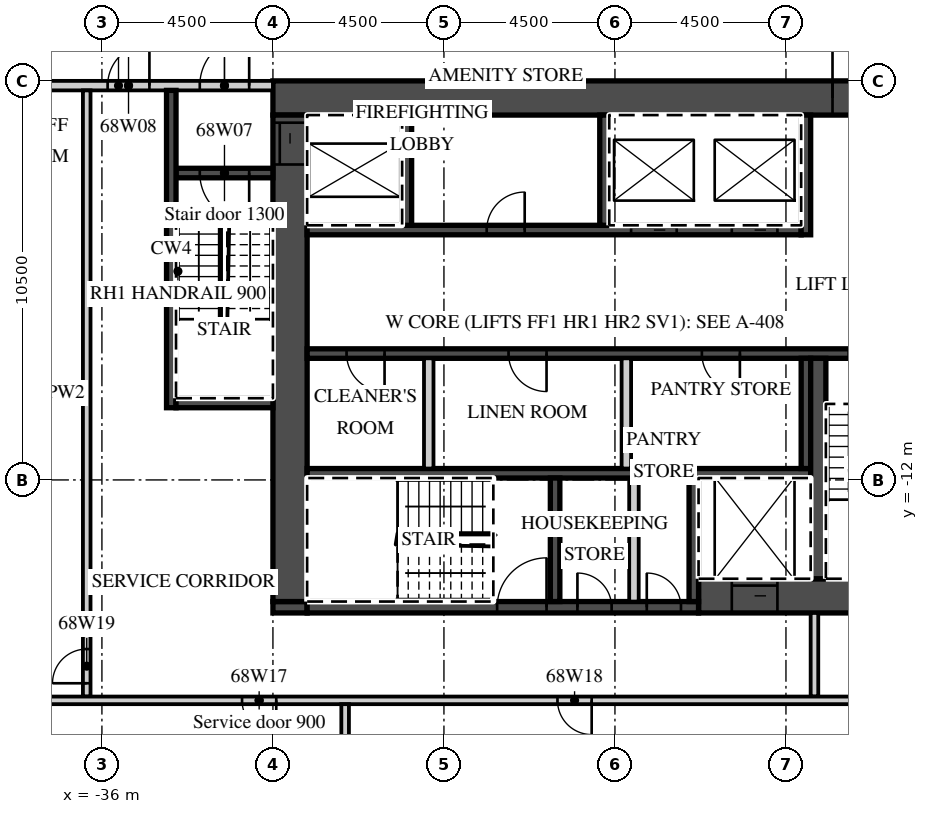
"""IFC4 building model, lengths in metres.
Left out: names, types, materials, properties, quantities, classifications, styles, units other than length and angle.
Written with IfcOpenShell. Run it as: python <this file> out.ifc"""

import sys

from ifc_helpers import new_model, si_unit, direction, frame, frame_2d, origin, place, context, subcontext, project, spatial, rectangle, extrude, element, fill, save


model = new_model("IFC4")
c1 = context("Model", 3, precision=1e-05, world=origin(), true_north=direction((0.0, 1.0)))
c2 = subcontext(c1, "Body", "Model", "MODEL_VIEW")
j1 = project(units=[si_unit("LENGTHUNIT", "METRE"), si_unit("PLANEANGLEUNIT", "RADIAN")], contexts=[c1])
p1 = place(None, origin())
s1 = spatial("IfcSite", under=j1, at=p1, CompositionType="ELEMENT")
p2 = place(p1, origin())
s2 = spatial("IfcBuilding", under=s1, at=p2, CompositionType="ELEMENT")
p3 = place(p2, frame((0.0, 0.0, 275.1)))
s3 = spatial("IfcBuildingStorey", under=s2, at=p3, CompositionType="ELEMENT", Elevation=275.1)
p4 = place(p3, frame((-31.5, -1.95, 0.0), z_axis=(0.0, 0.0, 1.0), x_axis=(1.0, 0.0, 0.0)))
e1 = element("IfcWall", 1, at=p4, inside=s3, PredefinedType="SHEAR", context=c2, shape_type="SweptSolid", body=[
    extrude(rectangle(XDim=18.0, YDim=0.9, at=frame_2d((9.0, 0.0))), origin(), (0.0, 0.0, 1.0), 3.02),
])
p5 = place(p4, frame((14.725, 0.0, 0.0)))
e2 = element("IfcOpeningElement", 2, at=p5, cuts=e1, PredefinedType="OPENING", context=c2, shape_type="SweptSolid", body=[
    extrude(rectangle(XDim=1.8, YDim=2.1, at=frame_2d((0.9, 1.05))), frame((0.0, 0.46, 0.0), z_axis=(0.0, -1.0, 0.0), x_axis=(1.0, 0.0, 0.0)), (0.0, 0.0, 1.0), 0.92),
])
p6 = place(p3, frame((-20.3, -15.05, 0.0), z_axis=(0.0, 0.0, 1.0), x_axis=(1.0, 0.0, 0.0)))
e3 = element("IfcWall", 3, at=p6, inside=s3, PredefinedType="SHEAR", context=c2, shape_type="SweptSolid", body=[
    extrude(rectangle(XDim=6.8, YDim=0.9, at=frame_2d((3.4, 0.0))), origin(), (0.0, 0.0, 1.0), 3.02),
])
p7 = place(p6, frame((0.875, 0.0, 0.0)))
e4 = element("IfcOpeningElement", 4, at=p7, cuts=e3, PredefinedType="OPENING", context=c2, shape_type="SweptSolid", body=[
    extrude(rectangle(XDim=1.2, YDim=2.1, at=frame_2d((0.6, 1.05))), frame((0.0, 0.46, 0.0), z_axis=(0.0, -1.0, 0.0), x_axis=(1.0, 0.0, 0.0)), (0.0, 0.0, 1.0), 0.92),
])
p8 = place(p3, frame((-31.5, -15.35, 0.0), z_axis=(0.0, 0.0, 1.0), x_axis=(1.0, 0.0, 0.0)))
e5 = element("IfcWall", 5, at=p8, inside=s3, PredefinedType="SHEAR", context=c2, shape_type="SweptSolid", body=[
    extrude(rectangle(XDim=0.9, YDim=0.3, at=frame_2d((0.45, 0.0))), origin(), (0.0, 0.0, 1.0), 3.02),
])
p9 = place(p3, frame((-30.6, -15.35, 0.0), z_axis=(0.0, 0.0, 1.0), x_axis=(1.0, 0.0, 0.0)))
e6 = element("IfcWall", 6, at=p9, inside=s3, PredefinedType="SHEAR", context=c2, shape_type="SweptSolid", body=[
    extrude(rectangle(XDim=10.3, YDim=0.3, at=frame_2d((5.15, 0.0))), origin(), (0.0, 0.0, 1.0), 3.02),
])
p10 = place(p9, frame((5.0, 0.0, 0.0)))
e7 = element("IfcOpeningElement", 7, at=p10, cuts=e6, PredefinedType="OPENING", context=c2, shape_type="SweptSolid", body=[
    extrude(rectangle(XDim=1.3, YDim=2.1, at=frame_2d((0.65, 1.05))), frame((0.0, 0.16, 0.0), z_axis=(0.0, -1.0, 0.0), x_axis=(1.0, 0.0, 0.0)), (0.0, 0.0, 1.0), 0.32),
])
p11 = place(p9, frame((7.113, 0.0, 0.0)))
e8 = element("IfcOpeningElement", 8, at=p11, cuts=e6, PredefinedType="OPENING", context=c2, shape_type="SweptSolid", body=[
    extrude(rectangle(XDim=0.9, YDim=2.1, at=frame_2d((0.45, 1.05))), frame((0.0, 0.16, 0.0), z_axis=(0.0, -1.0, 0.0), x_axis=(1.0, 0.0, 0.0)), (0.0, 0.0, 1.0), 0.32),
])
p12 = place(p9, frame((8.938, 0.0, 0.0)))
e9 = element("IfcOpeningElement", 9, at=p12, cuts=e6, PredefinedType="OPENING", context=c2, shape_type="SweptSolid", body=[
    extrude(rectangle(XDim=0.9, YDim=2.1, at=frame_2d((0.45, 1.05))), frame((0.0, 0.16, 0.0), z_axis=(0.0, -1.0, 0.0), x_axis=(1.0, 0.0, 0.0)), (0.0, 0.0, 1.0), 0.32),
])
p13 = place(p3, frame((-31.05, -15.2, 0.0), z_axis=(0.0, 0.0, 1.0), x_axis=(0.0, 1.0, 0.0)))
e10 = element("IfcWall", 10, at=p13, inside=s3, PredefinedType="SHEAR", context=c2, shape_type="SweptSolid", body=[
    extrude(rectangle(XDim=12.8, YDim=0.9, at=frame_2d((6.4, 0.0))), origin(), (0.0, 0.0, 1.0), 3.02),
])
p14 = place(p13, frame((11.5, 0.0, 0.0)))
e11 = element("IfcOpeningElement", 11, at=p14, cuts=e10, PredefinedType="OPENING", context=c2, shape_type="SweptSolid", body=[
    extrude(rectangle(XDim=1.1, YDim=2.1, at=frame_2d((0.55, 1.05))), frame((0.0, 0.46, 0.0), z_axis=(0.0, -1.0, 0.0), x_axis=(1.0, 0.0, 0.0)), (0.0, 0.0, 1.0), 0.92),
])
p15 = place(p3, frame((-30.6, -5.425, 0.0), z_axis=(0.0, 0.0, 1.0), x_axis=(1.0, 0.0, 0.0)))
e12 = element("IfcWall", 12, at=p15, inside=s3, PredefinedType="SHEAR", context=c2, shape_type="SweptSolid", body=[
    extrude(rectangle(XDim=13.0, YDim=0.25, at=frame_2d((6.5, 0.0))), origin(), (0.0, 0.0, 1.0), 3.02),
])
p16 = place(p15, frame((8.525, 0.0, 0.0)))
e13 = element("IfcOpeningElement", 13, at=p16, cuts=e12, PredefinedType="OPENING", context=c2, shape_type="SweptSolid", body=[
    extrude(rectangle(XDim=1.2, YDim=2.1, at=frame_2d((0.6, 1.05))), frame((0.0, 0.135, 0.0), z_axis=(0.0, -1.0, 0.0), x_axis=(1.0, 0.0, 0.0)), (0.0, 0.0, 1.0), 0.27),
])
p17 = place(p15, frame((11.175, 0.0, 0.0)))
e14 = element("IfcOpeningElement", 14, at=p17, cuts=e12, PredefinedType="OPENING", context=c2, shape_type="SweptSolid", body=[
    extrude(rectangle(XDim=1.2, YDim=2.1, at=frame_2d((0.6, 1.05))), frame((0.0, 0.135, 0.0), z_axis=(0.0, -1.0, 0.0), x_axis=(1.0, 0.0, 0.0)), (0.0, 0.0, 1.0), 0.27),
])
p18 = place(p15, frame((4.725, 0.0, 0.0)))
e15 = element("IfcOpeningElement", 15, at=p18, cuts=e12, PredefinedType="OPENING", context=c2, shape_type="SweptSolid", body=[
    extrude(rectangle(XDim=1.0, YDim=2.1, at=frame_2d((0.5, 1.05))), frame((0.0, 0.135, 0.0), z_axis=(0.0, -1.0, 0.0), x_axis=(1.0, 0.0, 0.0)), (0.0, 0.0, 1.0), 0.27),
])
p19 = place(p3, frame((-17.475, -5.55, 0.0), z_axis=(0.0, 0.0, 1.0), x_axis=(0.0, 1.0, 0.0)))
e16 = element("IfcWall", 16, at=p19, inside=s3, PredefinedType="SHEAR", context=c2, shape_type="SweptSolid", body=[
    extrude(rectangle(XDim=3.15, YDim=0.25, at=frame_2d((1.575, 0.0))), origin(), (0.0, 0.0, 1.0), 3.02),
])
for number, where, z_axis, x_axis in (
    (17, (-27.975, -5.3, 0.0), (0.0, 0.0, 1.0), (0.0, 1.0, 0.0)),
    (18, (-22.775, -5.3, 0.0), (0.0, 0.0, 1.0), (0.0, 1.0, 0.0)),
):
    element("IfcWall", number, at=place(p3, frame(where, z_axis=z_axis, x_axis=x_axis)), inside=s3, PredefinedType="SHEAR", context=c2, shape_type="SweptSolid", body=[
        extrude(rectangle(XDim=2.9, YDim=0.25, at=frame_2d((1.45, 0.0))), origin(), (0.0, 0.0, 1.0), 3.02),
    ])
p20 = place(p3, frame((-30.6, -8.675, 0.0), z_axis=(0.0, 0.0, 1.0), x_axis=(1.0, 0.0, 0.0)))
e19 = element("IfcWall", 19, at=p20, inside=s3, PredefinedType="SHEAR", context=c2, shape_type="SweptSolid", body=[
    extrude(rectangle(XDim=16.2, YDim=0.25, at=frame_2d((8.1, 0.0))), origin(), (0.0, 0.0, 1.0), 3.02),
])
p21 = place(p20, frame((14.25, 0.0, 0.0)))
e20 = element("IfcOpeningElement", 20, at=p21, cuts=e19, PredefinedType="OPENING", context=c2, shape_type="SweptSolid", body=[
    extrude(rectangle(XDim=1.3, YDim=2.1, at=frame_2d((0.65, 1.05))), frame((0.0, 0.135, 0.0), z_axis=(0.0, -1.0, 0.0), x_axis=(1.0, 0.0, 0.0)), (0.0, 0.0, 1.0), 0.27),
])
p22 = place(p20, frame((1.038, 0.0, 0.0)))
e21 = element("IfcOpeningElement", 21, at=p22, cuts=e19, PredefinedType="OPENING", context=c2, shape_type="SweptSolid", body=[
    extrude(rectangle(XDim=1.0, YDim=2.1, at=frame_2d((0.5, 1.05))), frame((0.0, 0.135, 0.0), z_axis=(0.0, -1.0, 0.0), x_axis=(1.0, 0.0, 0.0)), (0.0, 0.0, 1.0), 0.27),
])
p23 = place(p20, frame((5.3, 0.0, 0.0)))
e22 = element("IfcOpeningElement", 22, at=p23, cuts=e19, PredefinedType="OPENING", context=c2, shape_type="SweptSolid", body=[
    extrude(rectangle(XDim=1.0, YDim=2.1, at=frame_2d((0.5, 1.05))), frame((0.0, 0.135, 0.0), z_axis=(0.0, -1.0, 0.0), x_axis=(1.0, 0.0, 0.0)), (0.0, 0.0, 1.0), 0.27),
])
p24 = place(p20, frame((10.387, 0.0, 0.0)))
e23 = element("IfcOpeningElement", 23, at=p24, cuts=e19, PredefinedType="OPENING", context=c2, shape_type="SweptSolid", body=[
    extrude(rectangle(XDim=1.0, YDim=2.1, at=frame_2d((0.5, 1.05))), frame((0.0, 0.135, 0.0), z_axis=(0.0, -1.0, 0.0), x_axis=(1.0, 0.0, 0.0)), (0.0, 0.0, 1.0), 0.27),
])
p25 = place(p3, frame((-30.6, -11.825, 0.0), z_axis=(0.0, 0.0, 1.0), x_axis=(1.0, 0.0, 0.0)))
e24 = element("IfcWall", 24, at=p25, inside=s3, PredefinedType="SHEAR", context=c2, shape_type="SweptSolid", body=[
    extrude(rectangle(XDim=13.25, YDim=0.25, at=frame_2d((6.625, 0.0))), origin(), (0.0, 0.0, 1.0), 3.02),
])
p26 = place(p3, frame((-17.475, -11.7, 0.0), z_axis=(0.0, 0.0, 1.0), x_axis=(0.0, 1.0, 0.0)))
e25 = element("IfcWall", 25, at=p26, inside=s3, PredefinedType="SHEAR", context=c2, shape_type="SweptSolid", body=[
    extrude(rectangle(XDim=2.9, YDim=0.25, at=frame_2d((1.45, 0.0))), origin(), (0.0, 0.0, 1.0), 3.02),
])
for number, where, z_axis, x_axis in (
    (26, (-27.4, -11.7, 0.0), (0.0, 0.0, 1.0), (0.0, 1.0, 0.0)),
    (27, (-22.2, -11.7, 0.0), (0.0, 0.0, 1.0), (0.0, 1.0, 0.0)),
):
    element("IfcWall", number, at=place(p3, frame(where, z_axis=z_axis, x_axis=x_axis)), inside=s3, PredefinedType="PARTITIONING", context=c2, shape_type="SweptSolid", body=[
        extrude(rectangle(XDim=2.9, YDim=0.25, at=frame_2d((1.45, 0.0))), origin(), (0.0, 0.0, 1.0), 3.02),
    ])
p27 = place(p3, frame((-17.15, -14.6, 0.0), z_axis=(0.0, 0.0, 1.0), x_axis=(0.0, 1.0, 0.0)))
e28 = element("IfcWall", 28, at=p27, inside=s3, PredefinedType="SHEAR", context=c2, shape_type="SweptSolid", body=[
    extrude(rectangle(XDim=5.8, YDim=0.4, at=frame_2d((2.9, 0.0))), origin(), (0.0, 0.0, 1.0), 3.02),
])
for number, where, z_axis, x_axis in (
    (29, (-20.425, -15.2, 0.0), (0.0, 0.0, 1.0), (0.0, 1.0, 0.0)),
    (30, (-24.075, -15.2, 0.0), (0.0, 0.0, 1.0), (0.0, 1.0, 0.0)),
):
    element("IfcWall", number, at=place(p3, frame(where, z_axis=z_axis, x_axis=x_axis)), inside=s3, PredefinedType="SHEAR", context=c2, shape_type="SweptSolid", body=[
        extrude(rectangle(XDim=3.25, YDim=0.25, at=frame_2d((1.625, 0.0))), origin(), (0.0, 0.0, 1.0), 3.02),
    ])
p28 = place(p3, frame((-22.0, -15.2, 0.0), z_axis=(0.0, 0.0, 1.0), x_axis=(0.0, 1.0, 0.0)))
e31 = element("IfcWall", 31, at=p28, inside=s3, PredefinedType="PARTITIONING", context=c2, shape_type="SweptSolid", body=[
    extrude(rectangle(XDim=3.25, YDim=0.25, at=frame_2d((1.625, 0.0))), origin(), (0.0, 0.0, 1.0), 3.02),
])
p29 = place(p3, frame((-39.627, -1.625, 0.0), z_axis=(0.0, 0.0, 1.0), x_axis=(1.0, 0.0, 0.0)))
e32 = element("IfcWall", 32, at=p29, inside=s3, PredefinedType="PARTITIONING", context=c2, shape_type="SweptSolid", body=[
    extrude(rectangle(XDim=8.127, YDim=0.25, at=frame_2d((4.063, 0.0))), origin(), (0.0, 0.0, 1.0), 3.02),
])
p30 = place(p29, frame((6.202, 0.0, 0.0)))
e33 = element("IfcOpeningElement", 33, at=p30, cuts=e32, PredefinedType="OPENING", context=c2, shape_type="SweptSolid", body=[
    extrude(rectangle(XDim=1.3, YDim=2.1, at=frame_2d((0.65, 1.05))), frame((0.0, 0.135, 0.0), z_axis=(0.0, -1.0, 0.0), x_axis=(1.0, 0.0, 0.0)), (0.0, 0.0, 1.0), 0.27),
])
p31 = place(p29, frame((3.777, 0.0, 0.0)))
e34 = element("IfcOpeningElement", 34, at=p31, cuts=e32, PredefinedType="OPENING", context=c2, shape_type="SweptSolid", body=[
    extrude(rectangle(XDim=1.1, YDim=2.1, at=frame_2d((0.55, 1.05))), frame((0.0, 0.135, 0.0), z_axis=(0.0, -1.0, 0.0), x_axis=(1.0, 0.0, 0.0)), (0.0, 0.0, 1.0), 0.27),
])
p32 = place(p3, frame((-34.05, -3.925, 0.0), z_axis=(0.0, 0.0, 1.0), x_axis=(1.0, 0.0, 0.0)))
e35 = element("IfcWall", 35, at=p32, inside=s3, PredefinedType="SHEAR", context=c2, shape_type="SweptSolid", body=[
    extrude(rectangle(XDim=2.55, YDim=0.25, at=frame_2d((1.275, 0.0))), origin(), (0.0, 0.0, 1.0), 3.02),
])
p33 = place(p32, frame((0.625, 0.0, 0.0)))
e36 = element("IfcOpeningElement", 36, at=p33, cuts=e35, PredefinedType="OPENING", context=c2, shape_type="SweptSolid", body=[
    extrude(rectangle(XDim=1.3, YDim=2.1, at=frame_2d((0.65, 1.05))), frame((0.0, 0.135, 0.0), z_axis=(0.0, -1.0, 0.0), x_axis=(1.0, 0.0, 0.0)), (0.0, 0.0, 1.0), 0.27),
])
p34 = place(p3, frame((-34.175, -10.1, 0.0), z_axis=(0.0, 0.0, 1.0), x_axis=(0.0, 1.0, 0.0)))
e37 = element("IfcWall", 37, at=p34, inside=s3, PredefinedType="SHEAR", context=c2, shape_type="SweptSolid", body=[
    extrude(rectangle(XDim=8.35, YDim=0.25, at=frame_2d((4.175, 0.0))), origin(), (0.0, 0.0, 1.0), 3.02),
])
p35 = place(p3, frame((-34.05, -9.975, 0.0), z_axis=(0.0, 0.0, 1.0), x_axis=(1.0, 0.0, 0.0)))
e38 = element("IfcWall", 38, at=p35, inside=s3, PredefinedType="SHEAR", context=c2, shape_type="SweptSolid", body=[
    extrude(rectangle(XDim=2.55, YDim=0.25, at=frame_2d((1.275, 0.0))), origin(), (0.0, 0.0, 1.0), 3.02),
])
p36 = place(p3, frame((-17.25, -17.7, 0.0), z_axis=(0.0, 0.0, 1.0), x_axis=(0.0, 1.0, 0.0)))
e39 = element("IfcWall", 39, at=p36, inside=s3, PredefinedType="PARTITIONING", context=c2, shape_type="SweptSolid", body=[
    extrude(rectangle(XDim=2.2, YDim=0.2, at=frame_2d((1.1, 0.0))), origin(), (0.0, 0.0, 1.0), 3.02),
])
p37 = place(p3, frame((-36.4, -17.7, 0.0), z_axis=(0.0, 0.0, 1.0), x_axis=(0.0, 1.0, 0.0)))
e40 = element("IfcWall", 40, at=p37, inside=s3, PredefinedType="PARTITIONING", context=c2, shape_type="SweptSolid", body=[
    extrude(rectangle(XDim=15.95, YDim=0.2, at=frame_2d((7.975, 0.0))), origin(), (0.0, 0.0, 1.0), 3.02),
])
p38 = place(p37, frame((0.35, 0.0, 0.0)))
e41 = element("IfcOpeningElement", 41, at=p38, cuts=e40, PredefinedType="OPENING", context=c2, shape_type="SweptSolid", body=[
    extrude(rectangle(XDim=0.9, YDim=2.1, at=frame_2d((0.45, 1.05))), frame((0.0, 0.11, 0.0), z_axis=(0.0, -1.0, 0.0), x_axis=(1.0, 0.0, 0.0)), (0.0, 0.0, 1.0), 0.22),
])
p39 = place(p3, frame((-38.07, -17.8, 0.0), z_axis=(0.0, 0.0, 1.0), x_axis=(1.0, 0.0, 0.0)))
e42 = element("IfcWall", 42, at=p39, inside=s3, PredefinedType="PARTITIONING", context=c2, shape_type="SweptSolid", body=[
    extrude(rectangle(XDim=24.47, YDim=0.2, at=frame_2d((12.235, 0.0))), origin(), (0.0, 0.0, 1.0), 3.02),
])
p40 = place(p39, frame((5.757, 0.0, 0.0)))
e43 = element("IfcOpeningElement", 43, at=p40, cuts=e42, PredefinedType="OPENING", context=c2, shape_type="SweptSolid", body=[
    extrude(rectangle(XDim=0.9, YDim=2.1, at=frame_2d((0.45, 1.05))), frame((0.0, 0.11, 0.0), z_axis=(0.0, -1.0, 0.0), x_axis=(1.0, 0.0, 0.0)), (0.0, 0.0, 1.0), 0.22),
])
p41 = place(p39, frame((14.057, 0.0, 0.0)))
e44 = element("IfcOpeningElement", 44, at=p41, cuts=e42, PredefinedType="OPENING", context=c2, shape_type="SweptSolid", body=[
    extrude(rectangle(XDim=0.9, YDim=2.1, at=frame_2d((0.45, 1.05))), frame((0.0, 0.11, 0.0), z_axis=(0.0, -1.0, 0.0), x_axis=(1.0, 0.0, 0.0)), (0.0, 0.0, 1.0), 0.22),
])
p42 = place(p3, frame((-29.6, -22.947, 0.0), z_axis=(0.0, 0.0, 1.0), x_axis=(0.0, 1.0, 0.0)))
e45 = element("IfcWall", 45, at=p42, inside=s3, PredefinedType="PARTITIONING", context=c2, shape_type="SweptSolid", body=[
    extrude(rectangle(XDim=5.047, YDim=0.2, at=frame_2d((2.523, 0.0))), origin(), (0.0, 0.0, 1.0), 3.02),
])
p43 = place(p16, origin())
e46 = element("IfcDoor", 46, at=p43, inside=s3, OperationType="SLIDING_TO_LEFT", PredefinedType="DOOR", context=c2, shape_type="SweptSolid", body=[
    extrude(rectangle(XDim=1.2, YDim=2.1, at=frame_2d((0.6, 1.05))), frame((0.0, 0.025, 0.0), z_axis=(0.0, -1.0, 0.0), x_axis=(1.0, 0.0, 0.0)), (0.0, 0.0, 1.0), 0.05),
])
fill(e13, e46)
p44 = place(p17, origin())
e47 = element("IfcDoor", 47, at=p44, inside=s3, OperationType="SLIDING_TO_RIGHT", PredefinedType="DOOR", context=c2, shape_type="SweptSolid", body=[
    extrude(rectangle(XDim=1.2, YDim=2.1, at=frame_2d((0.6, 1.05))), frame((0.0, 0.025, 0.0), z_axis=(0.0, -1.0, 0.0), x_axis=(1.0, 0.0, 0.0)), (0.0, 0.0, 1.0), 0.05),
])
fill(e14, e47)
p45 = place(p7, origin())
e48 = element("IfcDoor", 48, at=p45, inside=s3, OperationType="SLIDING_TO_LEFT", PredefinedType="DOOR", context=c2, shape_type="SweptSolid", body=[
    extrude(rectangle(XDim=1.2, YDim=2.1, at=frame_2d((0.6, 1.05))), frame((0.0, 0.025, 0.0), z_axis=(0.0, -1.0, 0.0), x_axis=(1.0, 0.0, 0.0)), (0.0, 0.0, 1.0), 0.05),
])
fill(e4, e48)
p46 = place(p14, origin())
e49 = element("IfcDoor", 49, at=p46, inside=s3, OperationType="SLIDING_TO_RIGHT", PredefinedType="DOOR", context=c2, shape_type="SweptSolid", body=[
    extrude(rectangle(XDim=1.1, YDim=2.1, at=frame_2d((0.55, 1.05))), frame((0.0, 0.025, 0.0), z_axis=(0.0, -1.0, 0.0), x_axis=(1.0, 0.0, 0.0)), (0.0, 0.0, 1.0), 0.05),
])
fill(e11, e49)
p47 = place(p5, origin())
e50 = element("IfcDoor", 50, at=p47, inside=s3, OperationType="DOUBLE_DOOR_DOUBLE_SWING", PredefinedType="DOOR", context=c2, shape_type="SweptSolid", body=[
    extrude(rectangle(XDim=1.8, YDim=2.1, at=frame_2d((0.9, 1.05))), frame((0.0, 0.025, 0.0), z_axis=(0.0, -1.0, 0.0), x_axis=(1.0, 0.0, 0.0)), (0.0, 0.0, 1.0), 0.05),
])
fill(e2, e50)
p48 = place(p30, origin())
e51 = element("IfcDoor", 51, at=p48, inside=s3, OperationType="SINGLE_SWING_RIGHT", PredefinedType="DOOR", context=c2, shape_type="SweptSolid", body=[
    extrude(rectangle(XDim=1.3, YDim=2.1, at=frame_2d((0.65, 1.05))), frame((0.0, 0.025, 0.0), z_axis=(0.0, -1.0, 0.0), x_axis=(1.0, 0.0, 0.0)), (0.0, 0.0, 1.0), 0.05),
])
fill(e33, e51)
p49 = place(p33, origin())
e52 = element("IfcDoor", 52, at=p49, inside=s3, OperationType="SINGLE_SWING_RIGHT", PredefinedType="DOOR", context=c2, shape_type="SweptSolid", body=[
    extrude(rectangle(XDim=1.3, YDim=2.1, at=frame_2d((0.65, 1.05))), frame((0.0, 0.025, 0.0), z_axis=(0.0, -1.0, 0.0), x_axis=(1.0, 0.0, 0.0)), (0.0, 0.0, 1.0), 0.05),
])
fill(e36, e52)
p50 = place(p31, origin())
e53 = element("IfcDoor", 53, at=p50, inside=s3, OperationType="SINGLE_SWING_RIGHT", PredefinedType="DOOR", context=c2, shape_type="SweptSolid", body=[
    extrude(rectangle(XDim=1.1, YDim=2.1, at=frame_2d((0.55, 1.05))), frame((0.0, 0.025, 0.0), z_axis=(0.0, -1.0, 0.0), x_axis=(1.0, 0.0, 0.0)), (0.0, 0.0, 1.0), 0.05),
])
fill(e34, e53)
p51 = place(p21, origin())
e54 = element("IfcDoor", 54, at=p51, inside=s3, OperationType="SINGLE_SWING_RIGHT", PredefinedType="DOOR", context=c2, shape_type="SweptSolid", body=[
    extrude(rectangle(XDim=1.3, YDim=2.1, at=frame_2d((0.65, 1.05))), frame((0.0, 0.025, 0.0), z_axis=(0.0, -1.0, 0.0), x_axis=(1.0, 0.0, 0.0)), (0.0, 0.0, 1.0), 0.05),
])
fill(e20, e54)
p52 = place(p10, origin())
e55 = element("IfcDoor", 55, at=p52, inside=s3, OperationType="SINGLE_SWING_RIGHT", PredefinedType="DOOR", context=c2, shape_type="SweptSolid", body=[
    extrude(rectangle(XDim=1.3, YDim=2.1, at=frame_2d((0.65, 1.05))), frame((0.0, 0.025, 0.0), z_axis=(0.0, -1.0, 0.0), x_axis=(1.0, 0.0, 0.0)), (0.0, 0.0, 1.0), 0.05),
])
fill(e7, e55)
p53 = place(p11, origin())
e56 = element("IfcDoor", 56, at=p53, inside=s3, OperationType="SINGLE_SWING_LEFT", PredefinedType="DOOR", context=c2, shape_type="SweptSolid", body=[
    extrude(rectangle(XDim=0.9, YDim=2.1, at=frame_2d((0.45, 1.05))), frame((0.0, 0.025, 0.0), z_axis=(0.0, -1.0, 0.0), x_axis=(1.0, 0.0, 0.0)), (0.0, 0.0, 1.0), 0.05),
])
fill(e8, e56)
p54 = place(p12, origin())
e57 = element("IfcDoor", 57, at=p54, inside=s3, OperationType="SINGLE_SWING_LEFT", PredefinedType="DOOR", context=c2, shape_type="SweptSolid", body=[
    extrude(rectangle(XDim=0.9, YDim=2.1, at=frame_2d((0.45, 1.05))), frame((0.0, 0.025, 0.0), z_axis=(0.0, -1.0, 0.0), x_axis=(1.0, 0.0, 0.0)), (0.0, 0.0, 1.0), 0.05),
])
fill(e9, e57)
p55 = place(p22, origin())
e58 = element("IfcDoor", 58, at=p55, inside=s3, OperationType="SINGLE_SWING_RIGHT", PredefinedType="DOOR", context=c2, shape_type="SweptSolid", body=[
    extrude(rectangle(XDim=1.0, YDim=2.1, at=frame_2d((0.5, 1.05))), frame((0.0, 0.025, 0.0), z_axis=(0.0, -1.0, 0.0), x_axis=(1.0, 0.0, 0.0)), (0.0, 0.0, 1.0), 0.05),
])
fill(e21, e58)
p56 = place(p23, origin())
e59 = element("IfcDoor", 59, at=p56, inside=s3, OperationType="SINGLE_SWING_RIGHT", PredefinedType="DOOR", context=c2, shape_type="SweptSolid", body=[
    extrude(rectangle(XDim=1.0, YDim=2.1, at=frame_2d((0.5, 1.05))), frame((0.0, 0.025, 0.0), z_axis=(0.0, -1.0, 0.0), x_axis=(1.0, 0.0, 0.0)), (0.0, 0.0, 1.0), 0.05),
])
fill(e22, e59)
p57 = place(p24, origin())
e60 = element("IfcDoor", 60, at=p57, inside=s3, OperationType="SINGLE_SWING_RIGHT", PredefinedType="DOOR", context=c2, shape_type="SweptSolid", body=[
    extrude(rectangle(XDim=1.0, YDim=2.1, at=frame_2d((0.5, 1.05))), frame((0.0, 0.025, 0.0), z_axis=(0.0, -1.0, 0.0), x_axis=(1.0, 0.0, 0.0)), (0.0, 0.0, 1.0), 0.05),
])
fill(e23, e60)
p58 = place(p18, origin())
e61 = element("IfcDoor", 61, at=p58, inside=s3, OperationType="SINGLE_SWING_RIGHT", PredefinedType="DOOR", context=c2, shape_type="SweptSolid", body=[
    extrude(rectangle(XDim=1.0, YDim=2.1, at=frame_2d((0.5, 1.05))), frame((0.0, 0.025, 0.0), z_axis=(0.0, -1.0, 0.0), x_axis=(1.0, 0.0, 0.0)), (0.0, 0.0, 1.0), 0.05),
])
fill(e15, e61)
p59 = place(p40, origin())
e62 = element("IfcDoor", 62, at=p59, inside=s3, OperationType="SINGLE_SWING_RIGHT", PredefinedType="DOOR", context=c2, shape_type="SweptSolid", body=[
    extrude(rectangle(XDim=0.9, YDim=2.1, at=frame_2d((0.45, 1.05))), frame((0.0, 0.025, 0.0), z_axis=(0.0, -1.0, 0.0), x_axis=(1.0, 0.0, 0.0)), (0.0, 0.0, 1.0), 0.05),
])
fill(e43, e62)
p60 = place(p41, origin())
e63 = element("IfcDoor", 63, at=p60, inside=s3, OperationType="SINGLE_SWING_RIGHT", PredefinedType="DOOR", context=c2, shape_type="SweptSolid", body=[
    extrude(rectangle(XDim=0.9, YDim=2.1, at=frame_2d((0.45, 1.05))), frame((0.0, 0.025, 0.0), z_axis=(0.0, -1.0, 0.0), x_axis=(1.0, 0.0, 0.0)), (0.0, 0.0, 1.0), 0.05),
])
fill(e44, e63)
p61 = place(p38, origin())
e64 = element("IfcDoor", 64, at=p61, inside=s3, OperationType="SINGLE_SWING_LEFT", PredefinedType="DOOR", context=c2, shape_type="SweptSolid", body=[
    extrude(rectangle(XDim=0.9, YDim=2.1, at=frame_2d((0.45, 1.05))), frame((0.0, 0.025, 0.0), z_axis=(0.0, -1.0, 0.0), x_axis=(1.0, 0.0, 0.0)), (0.0, 0.0, 1.0), 0.05),
])
fill(e41, e64)
save(model, sys.argv[1])
